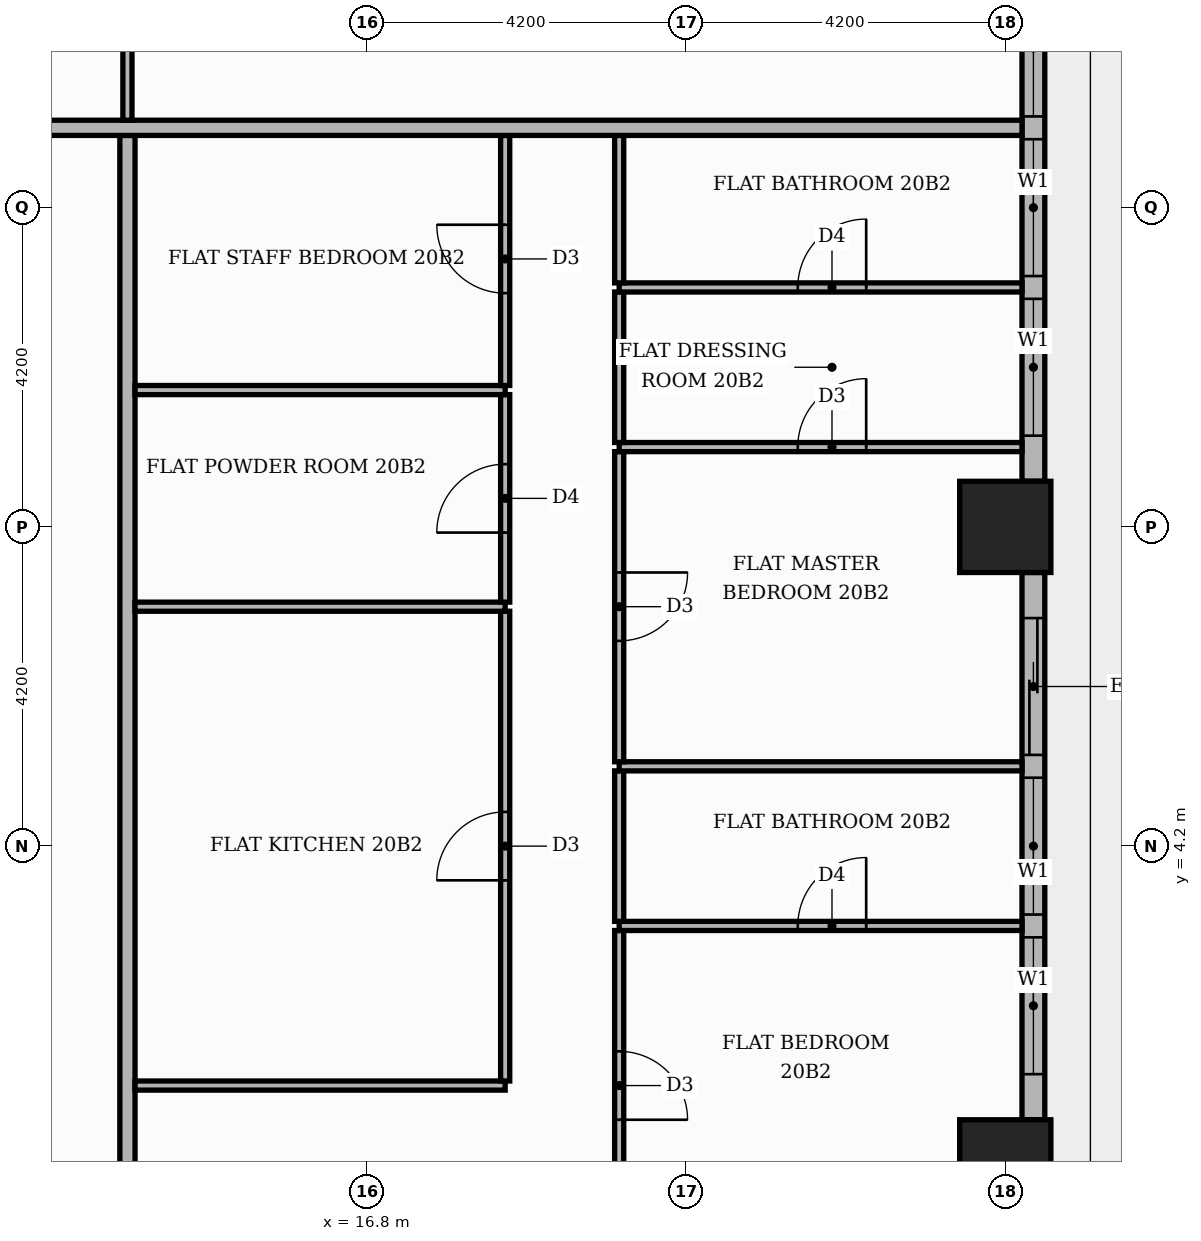
"""IFC4 building model, lengths in metres.
Left out: names, types, materials, properties, quantities, classifications, styles, units other than length and angle.
Written with IfcOpenShell. Run it as: python <this file> out.ifc"""

import sys

from ifc_helpers import new_model, si_unit, direction, frame, frame_2d, origin, origin_2d, place, context, subcontext, project, spatial, rectangle, extrude, element, fill, save


model = new_model("IFC4")
c1 = context("Model", 3, precision=1e-05, world=origin(), true_north=direction((0.0, 1.0)))
c2 = subcontext(c1, "Body", "Model", "MODEL_VIEW")
j1 = project(units=[si_unit("LENGTHUNIT", "METRE"), si_unit("PLANEANGLEUNIT", "RADIAN")], contexts=[c1])
p1 = place(None, origin())
s1 = spatial("IfcSite", under=j1, at=p1, CompositionType="ELEMENT")
p2 = place(p1, origin())
s2 = spatial("IfcBuilding", under=s1, at=p2, CompositionType="ELEMENT")
p3 = place(p2, frame((0.0, 0.0, 87.0)))
s3 = spatial("IfcBuildingStorey", under=s2, at=p3, CompositionType="ELEMENT", Elevation=87.0)
for number, where, z_axis, x_axis in (
    (1, (25.2, 0.0, 0.0), (0.0, 0.0, 1.0), (1.0, 0.0, 0.0)),
    (2, (25.2, 8.4, 0.0), (0.0, 0.0, 1.0), (1.0, 0.0, 0.0)),
):
    element("IfcColumn", number, at=place(p3, frame(where, z_axis=z_axis, x_axis=x_axis)), inside=s3, PredefinedType="COLUMN", context=c2, shape_type="SweptSolid", body=[
        extrude(rectangle(XDim=1.2, YDim=1.2, at=origin_2d()), origin(), (0.0, 0.0, 1.0), 3.9),
    ])
p4 = place(p3, frame((25.57, 0.6, 0.0), z_axis=(0.0, 0.0, 1.0), x_axis=(0.0, 1.0, 0.0)))
e3 = element("IfcWall", 3, at=p4, inside=s3, PredefinedType="STANDARD", context=c2, shape_type="SweptSolid", body=[
    extrude(rectangle(XDim=7.2, YDim=0.3, at=frame_2d((3.6, 0.0))), origin(), (0.0, 0.0, 1.0), 3.48),
])
p5 = place(p4, frame((0.6, 0.0, 0.9)))
e4 = element("IfcOpeningElement", 4, at=p5, cuts=e3, PredefinedType="OPENING", context=c2, shape_type="SweptSolid", body=[
    extrude(rectangle(XDim=1.8, YDim=2.1, at=frame_2d((0.9, 1.05))), frame((0.0, 0.16, 0.0), z_axis=(0.0, -1.0, 0.0), x_axis=(1.0, 0.0, 0.0)), (0.0, 0.0, 1.0), 0.32),
])
p6 = place(p4, frame((2.7, 0.0, 0.9)))
e5 = element("IfcOpeningElement", 5, at=p6, cuts=e3, PredefinedType="OPENING", context=c2, shape_type="SweptSolid", body=[
    extrude(rectangle(XDim=1.8, YDim=2.1, at=frame_2d((0.9, 1.05))), frame((0.0, 0.16, 0.0), z_axis=(0.0, -1.0, 0.0), x_axis=(1.0, 0.0, 0.0)), (0.0, 0.0, 1.0), 0.32),
])
p7 = place(p4, frame((4.8, 0.0, 0.0)))
e6 = element("IfcOpeningElement", 6, at=p7, cuts=e3, PredefinedType="OPENING", context=c2, shape_type="SweptSolid", body=[
    extrude(rectangle(XDim=1.8, YDim=2.4, at=frame_2d((0.9, 1.2))), frame((0.0, 0.16, 0.0), z_axis=(0.0, -1.0, 0.0), x_axis=(1.0, 0.0, 0.0)), (0.0, 0.0, 1.0), 0.32),
])
p8 = place(p3, frame((25.57, 9.0, 0.0), z_axis=(0.0, 0.0, 1.0), x_axis=(0.0, 1.0, 0.0)))
e7 = element("IfcWall", 7, at=p8, inside=s3, PredefinedType="STANDARD", context=c2, shape_type="SweptSolid", body=[
    extrude(rectangle(XDim=7.2, YDim=0.3, at=frame_2d((3.6, 0.0))), origin(), (0.0, 0.0, 1.0), 3.48),
])
p9 = place(p8, frame((0.6, 0.0, 0.9)))
e8 = element("IfcOpeningElement", 8, at=p9, cuts=e7, PredefinedType="OPENING", context=c2, shape_type="SweptSolid", body=[
    extrude(rectangle(XDim=1.8, YDim=2.1, at=frame_2d((0.9, 1.05))), frame((0.0, 0.16, 0.0), z_axis=(0.0, -1.0, 0.0), x_axis=(1.0, 0.0, 0.0)), (0.0, 0.0, 1.0), 0.32),
])
p10 = place(p8, frame((2.7, 0.0, 0.9)))
e9 = element("IfcOpeningElement", 9, at=p10, cuts=e7, PredefinedType="OPENING", context=c2, shape_type="SweptSolid", body=[
    extrude(rectangle(XDim=1.8, YDim=2.1, at=frame_2d((0.9, 1.05))), frame((0.0, 0.16, 0.0), z_axis=(0.0, -1.0, 0.0), x_axis=(1.0, 0.0, 0.0)), (0.0, 0.0, 1.0), 0.32),
])
p11 = place(p8, frame((4.8, 0.0, 0.9)))
e10 = element("IfcOpeningElement", 10, at=p11, cuts=e7, PredefinedType="OPENING", context=c2, shape_type="SweptSolid", body=[
    extrude(rectangle(XDim=1.8, YDim=2.1, at=frame_2d((0.9, 1.05))), frame((0.0, 0.16, 0.0), z_axis=(0.0, -1.0, 0.0), x_axis=(1.0, 0.0, 0.0)), (0.0, 0.0, 1.0), 0.32),
])
p12 = place(p3, frame((13.65, -5.15, 0.0), z_axis=(0.0, 0.0, 1.0), x_axis=(0.0, 1.0, 0.0)))
e11 = element("IfcWall", 11, at=p12, inside=s3, PredefinedType="PARTITIONING", context=c2, shape_type="SweptSolid", body=[
    extrude(rectangle(XDim=18.7, YDim=0.2, at=frame_2d((9.35, 0.0))), origin(), (0.0, 0.0, 1.0), 3.48),
])
p13 = place(p12, frame((3.55, 0.0, 0.0)))
e12 = element("IfcOpeningElement", 12, at=p13, cuts=e11, PredefinedType="OPENING", context=c2, shape_type="SweptSolid", body=[
    extrude(rectangle(XDim=1.1, YDim=2.4, at=frame_2d((0.55, 1.2))), frame((0.0, 0.11, 0.0), z_axis=(0.0, -1.0, 0.0), x_axis=(1.0, 0.0, 0.0)), (0.0, 0.0, 1.0), 0.22),
])
p14 = place(p3, frame((20.12, -0.99, 0.0), z_axis=(0.0, 0.0, 1.0), x_axis=(0.0, 1.0, 0.0)))
e13 = element("IfcWall", 13, at=p14, inside=s3, PredefinedType="PARTITIONING", context=c2, shape_type="SweptSolid", body=[
    extrude(rectangle(XDim=4.08, YDim=0.12, at=frame_2d((2.04, 0.0))), origin(), (0.0, 0.0, 1.0), 3.48),
])
p15 = place(p14, frame((1.59, 0.0, 0.0)))
e14 = element("IfcOpeningElement", 14, at=p15, cuts=e13, PredefinedType="OPENING", context=c2, shape_type="SweptSolid", body=[
    extrude(rectangle(XDim=0.9, YDim=2.1, at=frame_2d((0.45, 1.05))), frame((0.0, 0.07, 0.0), z_axis=(0.0, -1.0, 0.0), x_axis=(1.0, 0.0, 0.0)), (0.0, 0.0, 1.0), 0.14),
])
p16 = place(p3, frame((13.75, 1.05, 0.0), z_axis=(0.0, 0.0, 1.0), x_axis=(1.0, 0.0, 0.0)))
e15 = element("IfcWall", 15, at=p16, inside=s3, PredefinedType="PARTITIONING", context=c2, shape_type="SweptSolid", body=[
    extrude(rectangle(XDim=4.87, YDim=0.12, at=frame_2d((2.435, 0.0))), origin(), (0.0, 0.0, 1.0), 3.48),
])
p17 = place(p3, frame((18.62, 1.11, 0.0), z_axis=(0.0, 0.0, 1.0), x_axis=(0.0, 1.0, 0.0)))
e16 = element("IfcWall", 16, at=p17, inside=s3, PredefinedType="PARTITIONING", context=c2, shape_type="SweptSolid", body=[
    extrude(rectangle(XDim=6.18, YDim=0.12, at=frame_2d((3.09, 0.0))), origin(), (0.0, 0.0, 1.0), 3.48),
])
p18 = place(p17, frame((2.64, 0.0, 0.0)))
e17 = element("IfcOpeningElement", 17, at=p18, cuts=e16, PredefinedType="OPENING", context=c2, shape_type="SweptSolid", body=[
    extrude(rectangle(XDim=0.9, YDim=2.1, at=frame_2d((0.45, 1.05))), frame((0.0, 0.07, 0.0), z_axis=(0.0, -1.0, 0.0), x_axis=(1.0, 0.0, 0.0)), (0.0, 0.0, 1.0), 0.14),
])
p19 = place(p3, frame((20.12, 3.15, 0.0), z_axis=(0.0, 0.0, 1.0), x_axis=(1.0, 0.0, 0.0)))
e18 = element("IfcWall", 18, at=p19, inside=s3, PredefinedType="PARTITIONING", context=c2, shape_type="SweptSolid", body=[
    extrude(rectangle(XDim=5.3, YDim=0.12, at=frame_2d((2.65, 0.0))), origin(), (0.0, 0.0, 1.0), 3.48),
])
p20 = place(p19, frame((2.35, 0.0, 0.0)))
e19 = element("IfcOpeningElement", 19, at=p20, cuts=e18, PredefinedType="OPENING", context=c2, shape_type="SweptSolid", body=[
    extrude(rectangle(XDim=0.9, YDim=2.1, at=frame_2d((0.45, 1.05))), frame((0.0, 0.07, 0.0), z_axis=(0.0, -1.0, 0.0), x_axis=(1.0, 0.0, 0.0)), (0.0, 0.0, 1.0), 0.14),
])
p21 = place(p3, frame((20.12, 3.21, 0.0), z_axis=(0.0, 0.0, 1.0), x_axis=(0.0, 1.0, 0.0)))
e20 = element("IfcWall", 20, at=p21, inside=s3, PredefinedType="PARTITIONING", context=c2, shape_type="SweptSolid", body=[
    extrude(rectangle(XDim=1.98, YDim=0.12, at=frame_2d((0.99, 0.0))), origin(), (0.0, 0.0, 1.0), 3.48),
])
p22 = place(p3, frame((20.12, 5.25, 0.0), z_axis=(0.0, 0.0, 1.0), x_axis=(1.0, 0.0, 0.0)))
e21 = element("IfcWall", 21, at=p22, inside=s3, PredefinedType="PARTITIONING", context=c2, shape_type="SweptSolid", body=[
    extrude(rectangle(XDim=5.3, YDim=0.12, at=frame_2d((2.65, 0.0))), origin(), (0.0, 0.0, 1.0), 3.48),
])
p23 = place(p3, frame((20.12, 5.31, 0.0), z_axis=(0.0, 0.0, 1.0), x_axis=(0.0, 1.0, 0.0)))
e22 = element("IfcWall", 22, at=p23, inside=s3, PredefinedType="PARTITIONING", context=c2, shape_type="SweptSolid", body=[
    extrude(rectangle(XDim=4.08, YDim=0.12, at=frame_2d((2.04, 0.0))), origin(), (0.0, 0.0, 1.0), 3.48),
])
p24 = place(p23, frame((1.59, 0.0, 0.0)))
e23 = element("IfcOpeningElement", 23, at=p24, cuts=e22, PredefinedType="OPENING", context=c2, shape_type="SweptSolid", body=[
    extrude(rectangle(XDim=0.9, YDim=2.1, at=frame_2d((0.45, 1.05))), frame((0.0, 0.07, 0.0), z_axis=(0.0, -1.0, 0.0), x_axis=(1.0, 0.0, 0.0)), (0.0, 0.0, 1.0), 0.14),
])
p25 = place(p3, frame((13.75, 7.35, 0.0), z_axis=(0.0, 0.0, 1.0), x_axis=(1.0, 0.0, 0.0)))
e24 = element("IfcWall", 24, at=p25, inside=s3, PredefinedType="PARTITIONING", context=c2, shape_type="SweptSolid", body=[
    extrude(rectangle(XDim=4.87, YDim=0.12, at=frame_2d((2.435, 0.0))), origin(), (0.0, 0.0, 1.0), 3.48),
])
p26 = place(p3, frame((18.62, 7.41, 0.0), z_axis=(0.0, 0.0, 1.0), x_axis=(0.0, 1.0, 0.0)))
e25 = element("IfcWall", 25, at=p26, inside=s3, PredefinedType="PARTITIONING", context=c2, shape_type="SweptSolid", body=[
    extrude(rectangle(XDim=2.73, YDim=0.12, at=frame_2d((1.365, 0.0))), origin(), (0.0, 0.0, 1.0), 3.48),
])
p27 = place(p26, frame((0.915, 0.0, 0.0)))
e26 = element("IfcOpeningElement", 26, at=p27, cuts=e25, PredefinedType="OPENING", context=c2, shape_type="SweptSolid", body=[
    extrude(rectangle(XDim=0.9, YDim=2.1, at=frame_2d((0.45, 1.05))), frame((0.0, 0.07, 0.0), z_axis=(0.0, -1.0, 0.0), x_axis=(1.0, 0.0, 0.0)), (0.0, 0.0, 1.0), 0.14),
])
p28 = place(p3, frame((20.12, 9.45, 0.0), z_axis=(0.0, 0.0, 1.0), x_axis=(1.0, 0.0, 0.0)))
e27 = element("IfcWall", 27, at=p28, inside=s3, PredefinedType="PARTITIONING", context=c2, shape_type="SweptSolid", body=[
    extrude(rectangle(XDim=5.3, YDim=0.12, at=frame_2d((2.65, 0.0))), origin(), (0.0, 0.0, 1.0), 3.48),
])
p29 = place(p28, frame((2.35, 0.0, 0.0)))
e28 = element("IfcOpeningElement", 28, at=p29, cuts=e27, PredefinedType="OPENING", context=c2, shape_type="SweptSolid", body=[
    extrude(rectangle(XDim=0.9, YDim=2.1, at=frame_2d((0.45, 1.05))), frame((0.0, 0.07, 0.0), z_axis=(0.0, -1.0, 0.0), x_axis=(1.0, 0.0, 0.0)), (0.0, 0.0, 1.0), 0.14),
])
p30 = place(p3, frame((20.12, 9.51, 0.0), z_axis=(0.0, 0.0, 1.0), x_axis=(0.0, 1.0, 0.0)))
e29 = element("IfcWall", 29, at=p30, inside=s3, PredefinedType="PARTITIONING", context=c2, shape_type="SweptSolid", body=[
    extrude(rectangle(XDim=1.98, YDim=0.12, at=frame_2d((0.99, 0.0))), origin(), (0.0, 0.0, 1.0), 3.48),
])
p31 = place(p3, frame((13.75, 10.2, 0.0), z_axis=(0.0, 0.0, 1.0), x_axis=(1.0, 0.0, 0.0)))
e30 = element("IfcWall", 30, at=p31, inside=s3, PredefinedType="PARTITIONING", context=c2, shape_type="SweptSolid", body=[
    extrude(rectangle(XDim=4.87, YDim=0.12, at=frame_2d((2.435, 0.0))), origin(), (0.0, 0.0, 1.0), 3.48),
])
p32 = place(p3, frame((18.62, 10.26, 0.0), z_axis=(0.0, 0.0, 1.0), x_axis=(0.0, 1.0, 0.0)))
e31 = element("IfcWall", 31, at=p32, inside=s3, PredefinedType="PARTITIONING", context=c2, shape_type="SweptSolid", body=[
    extrude(rectangle(XDim=3.29, YDim=0.12, at=frame_2d((1.645, 0.0))), origin(), (0.0, 0.0, 1.0), 3.48),
])
p33 = place(p32, frame((1.215, 0.0, 0.0)))
e32 = element("IfcOpeningElement", 32, at=p33, cuts=e31, PredefinedType="OPENING", context=c2, shape_type="SweptSolid", body=[
    extrude(rectangle(XDim=0.9, YDim=2.1, at=frame_2d((0.45, 1.05))), frame((0.0, 0.07, 0.0), z_axis=(0.0, -1.0, 0.0), x_axis=(1.0, 0.0, 0.0)), (0.0, 0.0, 1.0), 0.14),
])
p34 = place(p3, frame((20.12, 11.55, 0.0), z_axis=(0.0, 0.0, 1.0), x_axis=(1.0, 0.0, 0.0)))
e33 = element("IfcWall", 33, at=p34, inside=s3, PredefinedType="PARTITIONING", context=c2, shape_type="SweptSolid", body=[
    extrude(rectangle(XDim=5.3, YDim=0.12, at=frame_2d((2.65, 0.0))), origin(), (0.0, 0.0, 1.0), 3.48),
])
p35 = place(p34, frame((2.35, 0.0, 0.0)))
e34 = element("IfcOpeningElement", 34, at=p35, cuts=e33, PredefinedType="OPENING", context=c2, shape_type="SweptSolid", body=[
    extrude(rectangle(XDim=0.9, YDim=2.1, at=frame_2d((0.45, 1.05))), frame((0.0, 0.07, 0.0), z_axis=(0.0, -1.0, 0.0), x_axis=(1.0, 0.0, 0.0)), (0.0, 0.0, 1.0), 0.14),
])
p36 = place(p3, frame((20.12, 11.61, 0.0), z_axis=(0.0, 0.0, 1.0), x_axis=(0.0, 1.0, 0.0)))
e35 = element("IfcWall", 35, at=p36, inside=s3, PredefinedType="PARTITIONING", context=c2, shape_type="SweptSolid", body=[
    extrude(rectangle(XDim=1.94, YDim=0.12, at=frame_2d((0.97, 0.0))), origin(), (0.0, 0.0, 1.0), 3.48),
])
p37 = place(p3, frame((-13.65, 13.65, 0.0), z_axis=(0.0, 0.0, 1.0), x_axis=(1.0, 0.0, 0.0)))
e36 = element("IfcWall", 36, at=p37, inside=s3, PredefinedType="PARTITIONING", context=c2, shape_type="SweptSolid", body=[
    extrude(rectangle(XDim=39.07, YDim=0.2, at=frame_2d((19.535, 0.0))), origin(), (0.0, 0.0, 1.0), 3.48),
])
p38 = place(p37, frame((23.6, 0.0, 0.0)))
e37 = element("IfcOpeningElement", 37, at=p38, cuts=e36, PredefinedType="OPENING", context=c2, shape_type="SweptSolid", body=[
    extrude(rectangle(XDim=1.1, YDim=2.4, at=frame_2d((0.55, 1.2))), frame((0.0, 0.11, 0.0), z_axis=(0.0, -1.0, 0.0), x_axis=(1.0, 0.0, 0.0)), (0.0, 0.0, 1.0), 0.22),
])
p39 = place(p3, frame((13.65, 13.75, 0.0), z_axis=(0.0, 0.0, 1.0), x_axis=(0.0, 1.0, 0.0)))
e38 = element("IfcWall", 38, at=p39, inside=s3, PredefinedType="PARTITIONING", context=c2, shape_type="SweptSolid", body=[
    extrude(rectangle(XDim=6.01, YDim=0.12, at=frame_2d((3.005, 0.0))), origin(), (0.0, 0.0, 1.0), 3.48),
])
p40 = place(p39, frame((2.535, 0.0, 0.0)))
e39 = element("IfcOpeningElement", 39, at=p40, cuts=e38, PredefinedType="OPENING", context=c2, shape_type="SweptSolid", body=[
    extrude(rectangle(XDim=0.9, YDim=2.1, at=frame_2d((0.45, 1.05))), frame((0.0, 0.07, 0.0), z_axis=(0.0, -1.0, 0.0), x_axis=(1.0, 0.0, 0.0)), (0.0, 0.0, 1.0), 0.14),
])
p41 = place(p5, origin())
e40 = element("IfcWindow", 40, at=p41, inside=s3, PartitioningType="SINGLE_PANEL", PredefinedType="WINDOW", context=c2, shape_type="SweptSolid", body=[
    extrude(rectangle(XDim=1.8, YDim=2.1, at=frame_2d((0.9, 1.05))), frame((0.0, 0.03, 0.0), z_axis=(0.0, -1.0, 0.0), x_axis=(1.0, 0.0, 0.0)), (0.0, 0.0, 1.0), 0.06),
])
fill(e4, e40)
p42 = place(p6, origin())
e41 = element("IfcWindow", 41, at=p42, inside=s3, PartitioningType="SINGLE_PANEL", PredefinedType="WINDOW", context=c2, shape_type="SweptSolid", body=[
    extrude(rectangle(XDim=1.8, YDim=2.1, at=frame_2d((0.9, 1.05))), frame((0.0, 0.03, 0.0), z_axis=(0.0, -1.0, 0.0), x_axis=(1.0, 0.0, 0.0)), (0.0, 0.0, 1.0), 0.06),
])
fill(e5, e41)
p43 = place(p7, origin())
e42 = element("IfcDoor", 42, at=p43, inside=s3, OperationType="SLIDING_TO_RIGHT", PredefinedType="DOOR", context=c2, shape_type="SweptSolid", body=[
    extrude(rectangle(XDim=1.8, YDim=2.4, at=frame_2d((0.9, 1.2))), frame((0.0, 0.025, 0.0), z_axis=(0.0, -1.0, 0.0), x_axis=(1.0, 0.0, 0.0)), (0.0, 0.0, 1.0), 0.05),
])
fill(e6, e42)
p44 = place(p9, origin())
e43 = element("IfcWindow", 43, at=p44, inside=s3, PartitioningType="SINGLE_PANEL", PredefinedType="WINDOW", context=c2, shape_type="SweptSolid", body=[
    extrude(rectangle(XDim=1.8, YDim=2.1, at=frame_2d((0.9, 1.05))), frame((0.0, 0.03, 0.0), z_axis=(0.0, -1.0, 0.0), x_axis=(1.0, 0.0, 0.0)), (0.0, 0.0, 1.0), 0.06),
])
fill(e8, e43)
p45 = place(p10, origin())
e44 = element("IfcWindow", 44, at=p45, inside=s3, PartitioningType="SINGLE_PANEL", PredefinedType="WINDOW", context=c2, shape_type="SweptSolid", body=[
    extrude(rectangle(XDim=1.8, YDim=2.1, at=frame_2d((0.9, 1.05))), frame((0.0, 0.03, 0.0), z_axis=(0.0, -1.0, 0.0), x_axis=(1.0, 0.0, 0.0)), (0.0, 0.0, 1.0), 0.06),
])
fill(e9, e44)
p46 = place(p11, origin())
e45 = element("IfcWindow", 45, at=p46, inside=s3, PartitioningType="SINGLE_PANEL", PredefinedType="WINDOW", context=c2, shape_type="SweptSolid", body=[
    extrude(rectangle(XDim=1.8, YDim=2.1, at=frame_2d((0.9, 1.05))), frame((0.0, 0.03, 0.0), z_axis=(0.0, -1.0, 0.0), x_axis=(1.0, 0.0, 0.0)), (0.0, 0.0, 1.0), 0.06),
])
fill(e10, e45)
p47 = place(p18, origin())
e46 = element("IfcDoor", 46, at=p47, inside=s3, OperationType="SINGLE_SWING_LEFT", PredefinedType="DOOR", context=c2, shape_type="SweptSolid", body=[
    extrude(rectangle(XDim=0.9, YDim=2.1, at=frame_2d((0.45, 1.05))), frame((0.0, 0.025, 0.0), z_axis=(0.0, -1.0, 0.0), x_axis=(1.0, 0.0, 0.0)), (0.0, 0.0, 1.0), 0.05),
])
fill(e17, e46)
p48 = place(p27, origin())
e47 = element("IfcDoor", 47, at=p48, inside=s3, OperationType="SINGLE_SWING_LEFT", PredefinedType="DOOR", context=c2, shape_type="SweptSolid", body=[
    extrude(rectangle(XDim=0.9, YDim=2.1, at=frame_2d((0.45, 1.05))), frame((0.0, 0.025, 0.0), z_axis=(0.0, -1.0, 0.0), x_axis=(1.0, 0.0, 0.0)), (0.0, 0.0, 1.0), 0.05),
])
fill(e26, e47)
p49 = place(p33, origin())
e48 = element("IfcDoor", 48, at=p49, inside=s3, OperationType="SINGLE_SWING_RIGHT", PredefinedType="DOOR", context=c2, shape_type="SweptSolid", body=[
    extrude(rectangle(XDim=0.9, YDim=2.1, at=frame_2d((0.45, 1.05))), frame((0.0, 0.025, 0.0), z_axis=(0.0, -1.0, 0.0), x_axis=(1.0, 0.0, 0.0)), (0.0, 0.0, 1.0), 0.05),
])
fill(e32, e48)
p50 = place(p15, frame((0.9, 0.0, 0.0), z_axis=(0.0, 0.0, 1.0), x_axis=(-1.0, 0.0, 0.0)))
e49 = element("IfcDoor", 49, at=p50, inside=s3, OperationType="SINGLE_SWING_LEFT", PredefinedType="DOOR", context=c2, shape_type="SweptSolid", body=[
    extrude(rectangle(XDim=0.9, YDim=2.1, at=frame_2d((0.45, 1.05))), frame((0.0, 0.025, 0.0), z_axis=(0.0, -1.0, 0.0), x_axis=(1.0, 0.0, 0.0)), (0.0, 0.0, 1.0), 0.05),
])
fill(e14, e49)
p51 = place(p20, origin())
e50 = element("IfcDoor", 50, at=p51, inside=s3, OperationType="SINGLE_SWING_RIGHT", PredefinedType="DOOR", context=c2, shape_type="SweptSolid", body=[
    extrude(rectangle(XDim=0.9, YDim=2.1, at=frame_2d((0.45, 1.05))), frame((0.0, 0.025, 0.0), z_axis=(0.0, -1.0, 0.0), x_axis=(1.0, 0.0, 0.0)), (0.0, 0.0, 1.0), 0.05),
])
fill(e19, e50)
p52 = place(p24, frame((0.9, 0.0, 0.0), z_axis=(0.0, 0.0, 1.0), x_axis=(-1.0, 0.0, 0.0)))
e51 = element("IfcDoor", 51, at=p52, inside=s3, OperationType="SINGLE_SWING_RIGHT", PredefinedType="DOOR", context=c2, shape_type="SweptSolid", body=[
    extrude(rectangle(XDim=0.9, YDim=2.1, at=frame_2d((0.45, 1.05))), frame((0.0, 0.025, 0.0), z_axis=(0.0, -1.0, 0.0), x_axis=(1.0, 0.0, 0.0)), (0.0, 0.0, 1.0), 0.05),
])
fill(e23, e51)
p53 = place(p29, origin())
e52 = element("IfcDoor", 52, at=p53, inside=s3, OperationType="SINGLE_SWING_RIGHT", PredefinedType="DOOR", context=c2, shape_type="SweptSolid", body=[
    extrude(rectangle(XDim=0.9, YDim=2.1, at=frame_2d((0.45, 1.05))), frame((0.0, 0.025, 0.0), z_axis=(0.0, -1.0, 0.0), x_axis=(1.0, 0.0, 0.0)), (0.0, 0.0, 1.0), 0.05),
])
fill(e28, e52)
p54 = place(p35, origin())
e53 = element("IfcDoor", 53, at=p54, inside=s3, OperationType="SINGLE_SWING_RIGHT", PredefinedType="DOOR", context=c2, shape_type="SweptSolid", body=[
    extrude(rectangle(XDim=0.9, YDim=2.1, at=frame_2d((0.45, 1.05))), frame((0.0, 0.025, 0.0), z_axis=(0.0, -1.0, 0.0), x_axis=(1.0, 0.0, 0.0)), (0.0, 0.0, 1.0), 0.05),
])
fill(e34, e53)
save(model, sys.argv[1])
